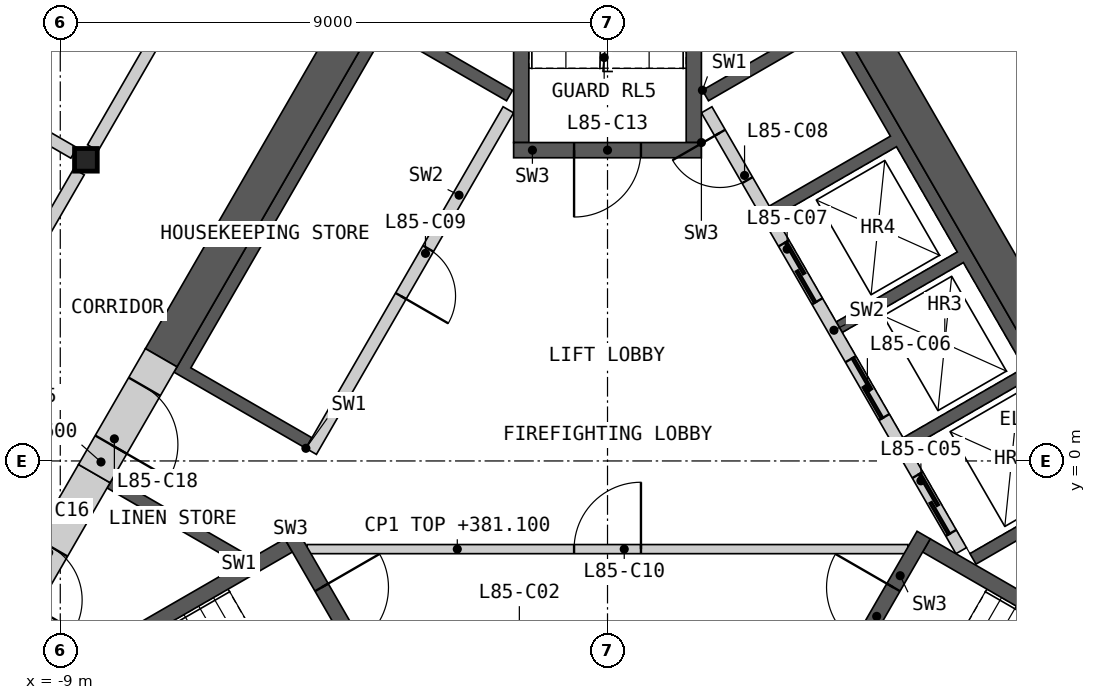
"""IFC4 building model, lengths in metres.
Left out: names, types, materials, properties, quantities, classifications, styles, units other than length and angle.
Written with IfcOpenShell. Run it as: python <this file> out.ifc"""

import sys

from ifc_helpers import new_model, si_unit, direction, frame, frame_2d, origin, origin_2d, place, context, subcontext, project, spatial, polyline, rectangle, i_section, outline, extrude, element, fill, save


model = new_model("IFC4")
c1 = context("Model", 3, precision=1e-05, world=origin(), true_north=direction((0.0, 1.0)))
c2 = subcontext(c1, "Body", "Model", "MODEL_VIEW")
j1 = project(units=[si_unit("LENGTHUNIT", "METRE"), si_unit("PLANEANGLEUNIT", "RADIAN")], contexts=[c1])
p1 = place(None, origin())
s1 = spatial("IfcSite", under=j1, at=p1, CompositionType="ELEMENT")
p2 = place(p1, origin())
s2 = spatial("IfcBuilding", under=s1, at=p2, CompositionType="ELEMENT")
p3 = place(p2, frame((0.0, 0.0, 378.0)))
s3 = spatial("IfcBuildingStorey", under=s2, at=p3, CompositionType="ELEMENT", Elevation=378.0)
p4 = place(p3, frame((-8.578, 4.953, 0.0), z_axis=(0.0, 0.0, 1.0), x_axis=(1.0, 0.0, 0.0)))
e1 = element("IfcColumn", 1, at=p4, inside=s3, PredefinedType="COLUMN", context=c2, shape_type="SweptSolid", body=[
    extrude(i_section(OverallWidth=0.374, OverallDepth=0.372, WebThickness=0.016, FlangeThickness=0.026, at=origin_2d()), origin(), (0.0, 0.0, 1.0), 3.4),
])
p5 = place(p3, origin())
e2 = element("IfcWall", 2, at=p5, inside=s3, PredefinedType="SHEAR", context=c2, shape_type="SweptSolid", body=[
    extrude(outline(polyline([(1.561, 6.097), (3.731, 7.35), (8.231, -0.444), (6.061, -1.697), (5.96, -1.524), (7.952, -0.374), (6.952, 1.358), (4.96, 0.208), (4.861, 0.381), (6.852, 1.531), (5.852, 3.263), (3.861, 2.113), (3.76, 2.287), (5.752, 3.437), (4.752, 5.169), (2.76, 4.019), (2.66, 4.192), (4.652, 5.342), (3.652, 7.074), (1.66, 5.924), (1.561, 6.097)])), origin(), (0.0, 0.0, 1.0), 3.1),
])
p6 = place(p3, frame((5.817, -1.476, 0.0), z_axis=(0.0, 0.0, 1.0), x_axis=(-0.500002616675, 0.866023893041, 0.0)))
e3 = element("IfcWall", 3, at=p6, inside=s3, PredefinedType="SOLIDWALL", context=c2, shape_type="SweptSolid", body=[
    extrude(rectangle(XDim=8.373, YDim=0.2, at=frame_2d((4.187, 0.0))), origin(), (0.0, 0.0, 1.0), 3.1),
])
p7 = place(p6, frame((0.337, 0.0, 0.0)))
e4 = element("IfcOpeningElement", 4, at=p7, cuts=e3, PredefinedType="OPENING", context=c2, shape_type="SweptSolid", body=[
    extrude(rectangle(XDim=1.1, YDim=2.1, at=frame_2d((0.55, 1.05))), frame((0.0, 0.11, 0.0), z_axis=(0.0, -1.0, 0.0), x_axis=(1.0, 0.0, 0.0)), (0.0, 0.0, 1.0), 0.22),
])
p8 = place(p6, frame((2.537, 0.0, 0.0)))
e5 = element("IfcOpeningElement", 5, at=p8, cuts=e3, PredefinedType="OPENING", context=c2, shape_type="SweptSolid", body=[
    extrude(rectangle(XDim=1.1, YDim=2.1, at=frame_2d((0.55, 1.05))), frame((0.0, 0.11, 0.0), z_axis=(0.0, -1.0, 0.0), x_axis=(1.0, 0.0, 0.0)), (0.0, 0.0, 1.0), 0.22),
])
p9 = place(p6, frame((4.737, 0.0, 0.0)))
e6 = element("IfcOpeningElement", 6, at=p9, cuts=e3, PredefinedType="OPENING", context=c2, shape_type="SweptSolid", body=[
    extrude(rectangle(XDim=1.1, YDim=2.1, at=frame_2d((0.55, 1.05))), frame((0.0, 0.11, 0.0), z_axis=(0.0, -1.0, 0.0), x_axis=(1.0, 0.0, 0.0)), (0.0, 0.0, 1.0), 0.22),
])
p10 = place(p6, frame((7.037, 0.0, 0.0)))
e7 = element("IfcOpeningElement", 7, at=p10, cuts=e3, PredefinedType="OPENING", context=c2, shape_type="SweptSolid", body=[
    extrude(rectangle(XDim=0.9, YDim=2.1, at=frame_2d((0.45, 1.05))), frame((0.0, 0.11, 0.0), z_axis=(0.0, -1.0, 0.0), x_axis=(1.0, 0.0, 0.0)), (0.0, 0.0, 1.0), 0.22),
])
p11 = place(p3, origin())
e8 = element("IfcWall", 8, at=p11, inside=s3, PredefinedType="SHEAR", context=c2, shape_type="SweptSolid", body=[
    extrude(outline(polyline([(-6.061, -1.697), (-8.231, -0.444), (-8.131, -0.271), (-5.96, -1.524), (-6.061, -1.697)])), origin(), (0.0, 0.0, 1.0), 3.1),
])
p12 = place(p3, origin())
e9 = element("IfcWall", 9, at=p12, inside=s3, PredefinedType="SHEAR", context=c2, shape_type="SweptSolid", body=[
    extrude(outline(polyline([(-4.96, 0.208), (-7.131, 1.461), (-3.731, 7.35), (-1.561, 6.097), (-1.66, 5.924), (-3.652, 7.074), (-6.852, 1.531), (-4.861, 0.381), (-4.96, 0.208)])), origin(), (0.0, 0.0, 1.0), 3.1),
])
p13 = place(p3, frame((-1.631, 5.776, 0.0), z_axis=(0.0, 0.0, 1.0), x_axis=(-0.499992876559, -0.866029516466, 0.0)))
e10 = element("IfcWall", 10, at=p13, inside=s3, PredefinedType="SOLIDWALL", context=c2, shape_type="SweptSolid", body=[
    extrude(rectangle(XDim=6.486, YDim=0.2, at=frame_2d((3.243, 0.0))), origin(), (0.0, 0.0, 1.0), 3.1),
])
p14 = place(p13, frame((2.637, 0.0, 0.0)))
e11 = element("IfcOpeningElement", 11, at=p14, cuts=e10, PredefinedType="OPENING", context=c2, shape_type="SweptSolid", body=[
    extrude(rectangle(XDim=0.9, YDim=2.1, at=frame_2d((0.45, 1.05))), frame((0.0, 0.11, 0.0), z_axis=(0.0, -1.0, 0.0), x_axis=(1.0, 0.0, 0.0)), (0.0, 0.0, 1.0), 0.22),
])
p15 = place(p3, frame((-4.941, -1.45, 0.0), z_axis=(0.0, 0.0, 1.0), x_axis=(1.0, 0.0, 0.0)))
e12 = element("IfcWall", 12, at=p15, inside=s3, PredefinedType="PARTITIONING", context=c2, shape_type="SweptSolid", body=[
    extrude(rectangle(XDim=9.882, YDim=0.15, at=frame_2d((4.941, 0.0))), origin(), (0.0, 0.0, 1.0), 3.1),
])
p16 = place(p15, frame((4.391, 0.0, 0.0)))
e13 = element("IfcOpeningElement", 13, at=p16, cuts=e12, PredefinedType="OPENING", context=c2, shape_type="SweptSolid", body=[
    extrude(rectangle(XDim=1.1, YDim=2.1, at=frame_2d((0.55, 1.05))), frame((0.0, 0.085, 0.0), z_axis=(0.0, -1.0, 0.0), x_axis=(1.0, 0.0, 0.0)), (0.0, 0.0, 1.0), 0.17),
])
p17 = place(p3, origin())
e14 = element("IfcWall", 14, at=p17, inside=s3, PredefinedType="SHEAR", context=c2, shape_type="SweptSolid", body=[
    extrude(outline(polyline([(-5.307, -1.281), (-10.374, -4.206), (-10.032, -4.298), (-5.182, -1.498), (-5.307, -1.281)])), origin(), (0.0, 0.0, 1.0), 3.1),
])
p18 = place(p3, frame((-5.199, -1.219, 0.0), z_axis=(0.0, 0.0, 1.0), x_axis=(0.499982516597, -0.866035497597, 0.0)))
e15 = element("IfcWall", 15, at=p18, inside=s3, PredefinedType="SHEAR", context=c2, shape_type="SweptSolid", body=[
    extrude(rectangle(XDim=3.088, YDim=0.25, at=frame_2d((1.544, 0.0))), origin(), (0.0, 0.0, 1.0), 3.1),
])
p19 = place(p18, frame((0.994, 0.0, 0.0)))
e16 = element("IfcOpeningElement", 16, at=p19, cuts=e15, PredefinedType="OPENING", context=c2, shape_type="SweptSolid", body=[
    extrude(rectangle(XDim=1.1, YDim=2.1, at=frame_2d((0.55, 1.05))), frame((0.0, 0.135, 0.0), z_axis=(0.0, -1.0, 0.0), x_axis=(1.0, 0.0, 0.0)), (0.0, 0.0, 1.0), 0.27),
])
p20 = place(p3, origin())
e17 = element("IfcWall", 17, at=p20, inside=s3, PredefinedType="SHEAR", context=c2, shape_type="SweptSolid", body=[
    extrude(outline(polyline([(10.032, -4.298), (10.374, -4.206), (5.307, -1.281), (5.182, -1.498), (10.032, -4.298)])), origin(), (0.0, 0.0, 1.0), 3.1),
])
p21 = place(p3, frame((3.655, -3.893, 0.0), z_axis=(0.0, 0.0, 1.0), x_axis=(0.499982516597, 0.866035497597, 0.0)))
e18 = element("IfcWall", 18, at=p21, inside=s3, PredefinedType="SHEAR", context=c2, shape_type="SweptSolid", body=[
    extrude(rectangle(XDim=3.088, YDim=0.25, at=frame_2d((1.544, 0.0))), origin(), (0.0, 0.0, 1.0), 3.1),
])
p22 = place(p21, frame((0.994, 0.0, 0.0)))
e19 = element("IfcOpeningElement", 19, at=p22, cuts=e18, PredefinedType="OPENING", context=c2, shape_type="SweptSolid", body=[
    extrude(rectangle(XDim=1.1, YDim=2.1, at=frame_2d((0.55, 1.05))), frame((0.0, 0.135, 0.0), z_axis=(0.0, -1.0, 0.0), x_axis=(1.0, 0.0, 0.0)), (0.0, 0.0, 1.0), 0.27),
])
p23 = place(p3, origin())
e20 = element("IfcWall", 20, at=p23, inside=s3, PredefinedType="SHEAR", context=c2, shape_type="SweptSolid", body=[
    extrude(outline(polyline([(1.544, 5.237), (1.544, 11.087), (1.294, 10.837), (1.294, 5.237), (1.544, 5.237)])), origin(), (0.0, 0.0, 1.0), 3.1),
])
p24 = place(p3, origin())
e21 = element("IfcWall", 21, at=p24, inside=s3, PredefinedType="SHEAR", context=c2, shape_type="SweptSolid", body=[
    extrude(outline(polyline([(-1.294, 10.837), (-1.544, 11.087), (-1.544, 5.237), (-1.294, 5.237), (-1.294, 10.837)])), origin(), (0.0, 0.0, 1.0), 3.1),
])
p25 = place(p3, frame((1.544, 5.112, 0.0), z_axis=(0.0, 0.0, 1.0), x_axis=(-1.0, 0.0, 0.0)))
e22 = element("IfcWall", 22, at=p25, inside=s3, PredefinedType="SHEAR", context=c2, shape_type="SweptSolid", body=[
    extrude(rectangle(XDim=3.088, YDim=0.25, at=frame_2d((1.544, 0.0))), origin(), (0.0, 0.0, 1.0), 3.1),
])
p26 = place(p25, frame((0.994, 0.0, 0.0)))
e23 = element("IfcOpeningElement", 23, at=p26, cuts=e22, PredefinedType="OPENING", context=c2, shape_type="SweptSolid", body=[
    extrude(rectangle(XDim=1.1, YDim=2.1, at=frame_2d((0.55, 1.05))), frame((0.0, 0.135, 0.0), z_axis=(0.0, -1.0, 0.0), x_axis=(1.0, 0.0, 0.0)), (0.0, 0.0, 1.0), 0.27),
])
p27 = place(p3, frame((8.686, -0.634, 0.0), z_axis=(0.0, 0.0, 1.0), x_axis=(-0.500004601921, 0.866022746848, 0.0)))
e24 = element("IfcWall", 24, at=p27, inside=s3, PredefinedType="SHEAR", context=c2, shape_type="SweptSolid", body=[
    extrude(rectangle(XDim=16.853, YDim=0.6, at=frame_2d((8.426, 0.0))), origin(), (0.0, 0.0, 1.0), 3.1),
])
p28 = place(p3, frame((-3.794, 7.84, 0.0), z_axis=(0.0, 0.0, 1.0), x_axis=(-0.499974747889, -0.866039982607, 0.0)))
e25 = element("IfcWall", 25, at=p28, inside=s3, PredefinedType="SHEAR", context=c2, shape_type="SweptSolid", body=[
    extrude(rectangle(XDim=7.092, YDim=0.6, at=frame_2d((3.546, 0.0))), origin(), (0.0, 0.0, 1.0), 3.1),
])
p29 = place(p3, frame((-8.44, -0.208, 0.0), z_axis=(0.0, 0.0, 1.0), x_axis=(-0.499997052475, -0.866027105532, 0.0)))
e26 = element("IfcWall", 26, at=p29, inside=s3, PredefinedType="SHEAR", context=c2, shape_type="SweptSolid", body=[
    extrude(rectangle(XDim=3.001, YDim=0.6, at=frame_2d((1.501, 0.0))), origin(), (0.0, 0.0, 1.0), 3.1),
])
p30 = place(p29, frame((1.4, 0.0, 0.0)))
e27 = element("IfcOpeningElement", 27, at=p30, cuts=e26, PredefinedType="OPENING", context=c2, shape_type="SweptSolid", body=[
    extrude(rectangle(XDim=1.0, YDim=2.1, at=frame_2d((0.5, 1.05))), frame((0.0, 0.31, 0.0), z_axis=(0.0, -1.0, 0.0), x_axis=(1.0, 0.0, 0.0)), (0.0, 0.0, 1.0), 0.62),
])
p31 = place(p3, frame((-7.34, 1.698, 0.0), z_axis=(0.0, 0.0, 1.0), x_axis=(-0.50002983664, -0.866008176907, 0.0)))
e28 = element("IfcWall", 28, at=p31, inside=s3, PredefinedType="SHEAR", context=c2, shape_type="SweptSolid", body=[
    extrude(rectangle(XDim=2.2, YDim=0.6, at=frame_2d((1.1, 0.0))), origin(), (0.0, 0.0, 1.0), 3.1),
])
p32 = place(p31, frame((0.55, 0.0, 0.0)))
e29 = element("IfcOpeningElement", 29, at=p32, cuts=e28, PredefinedType="OPENING", context=c2, shape_type="SweptSolid", body=[
    extrude(rectangle(XDim=1.1, YDim=2.1, at=frame_2d((0.55, 1.05))), frame((0.0, 0.31, 0.0), z_axis=(0.0, -1.0, 0.0), x_axis=(1.0, 0.0, 0.0)), (0.0, 0.0, 1.0), 0.62),
])
p33 = place(p3, frame((4.403, 12.185, 0.0), z_axis=(0.0, 0.0, 1.0), x_axis=(0.499992155518, -0.866029932751, 0.0)))
e30 = element("IfcWall", 30, at=p33, inside=s3, PredefinedType="PARTITIONING", context=c2, shape_type="SweptSolid", body=[
    extrude(rectangle(XDim=8.123, YDim=0.2, at=frame_2d((4.062, 0.0))), origin(), (0.0, 0.0, 1.0), 3.1),
])
p34 = place(p33, frame((3.963, 0.0, 0.0)))
e31 = element("IfcOpeningElement", 31, at=p34, cuts=e30, PredefinedType="OPENING", context=c2, shape_type="SweptSolid", body=[
    extrude(rectangle(XDim=1.0, YDim=2.1, at=frame_2d((0.5, 1.05))), frame((0.0, 0.11, 0.0), z_axis=(0.0, -1.0, 0.0), x_axis=(1.0, 0.0, 0.0)), (0.0, 0.0, 1.0), 0.22),
])
p35 = place(p3, frame((-8.465, 5.15, 0.0), z_axis=(0.0, 0.0, 1.0), x_axis=(0.499992155518, 0.866029932751, 0.0)))
e32 = element("IfcWall", 32, at=p35, inside=s3, PredefinedType="PARTITIONING", context=c2, shape_type="SweptSolid", body=[
    extrude(rectangle(XDim=8.123, YDim=0.2, at=frame_2d((4.062, 0.0))), origin(), (0.0, 0.0, 1.0), 3.1),
])
p36 = place(p35, frame((3.587, 0.0, 0.0)))
e33 = element("IfcOpeningElement", 33, at=p36, cuts=e32, PredefinedType="OPENING", context=c2, shape_type="SweptSolid", body=[
    extrude(rectangle(XDim=0.95, YDim=2.1, at=frame_2d((0.475, 1.05))), frame((0.0, 0.11, 0.0), z_axis=(0.0, -1.0, 0.0), x_axis=(1.0, 0.0, 0.0)), (0.0, 0.0, 1.0), 0.22),
])
p37 = place(p3, frame((-12.754, -2.279, 0.0), z_axis=(0.0, 0.0, 1.0), x_axis=(0.500001682468, 0.866024432409, 0.0)))
e34 = element("IfcWall", 34, at=p37, inside=s3, PredefinedType="PARTITIONING", context=c2, shape_type="SweptSolid", body=[
    extrude(rectangle(XDim=8.124, YDim=0.2, at=frame_2d((4.062, 0.0))), origin(), (0.0, 0.0, 1.0), 3.1),
])
p38 = place(p37, frame((3.762, 0.0, 0.0)))
e35 = element("IfcOpeningElement", 35, at=p38, cuts=e34, PredefinedType="OPENING", context=c2, shape_type="SweptSolid", body=[
    extrude(rectangle(XDim=1.0, YDim=2.1, at=frame_2d((0.5, 1.05))), frame((0.0, 0.11, 0.0), z_axis=(0.0, -1.0, 0.0), x_axis=(1.0, 0.0, 0.0)), (0.0, 0.0, 1.0), 0.22),
])
p39 = place(p3, frame((-11.473, 6.74, 0.0), z_axis=(0.0, 0.0, 1.0), x_axis=(0.500001082559, 0.866024778768, 0.0)))
e36 = element("IfcWall", 36, at=p39, inside=s3, PredefinedType="PARTITIONING", context=c2, shape_type="SweptSolid", body=[
    extrude(rectangle(XDim=15.094, YDim=0.2, at=frame_2d((7.547, 0.0))), origin(), (0.0, 0.0, 1.0), 2.33),
])
p40 = place(p39, frame((10.383, 0.0, 0.0)))
e37 = element("IfcOpeningElement", 37, at=p40, cuts=e36, PredefinedType="OPENING", context=c2, shape_type="SweptSolid", body=[
    extrude(rectangle(XDim=0.95, YDim=2.1, at=frame_2d((0.475, 1.05))), frame((0.0, 0.11, 0.0), z_axis=(0.0, -1.0, 0.0), x_axis=(1.0, 0.0, 0.0)), (0.0, 0.0, 1.0), 0.22),
])
p41 = place(p3, frame((-18.869, 10.894, 0.0), z_axis=(0.0, 0.0, 1.0), x_axis=(0.866023724155, -0.500002909193, 0.0)))
e38 = element("IfcWall", 38, at=p41, inside=s3, PredefinedType="PARTITIONING", context=c2, shape_type="SweptSolid", body=[
    extrude(rectangle(XDim=11.655, YDim=0.2, at=frame_2d((5.827, 0.0))), origin(), (0.0, 0.0, 1.0), 2.33),
])
p42 = place(p7, origin())
e39 = element("IfcDoor", 39, at=p42, inside=s3, OperationType="SLIDING_TO_LEFT", PredefinedType="DOOR", context=c2, shape_type="SweptSolid", body=[
    extrude(rectangle(XDim=1.1, YDim=2.1, at=frame_2d((0.55, 1.05))), frame((0.0, 0.025, 0.0), z_axis=(0.0, -1.0, 0.0), x_axis=(1.0, 0.0, 0.0)), (0.0, 0.0, 1.0), 0.05),
])
fill(e4, e39)
p43 = place(p8, origin())
e40 = element("IfcDoor", 40, at=p43, inside=s3, OperationType="SLIDING_TO_LEFT", PredefinedType="DOOR", context=c2, shape_type="SweptSolid", body=[
    extrude(rectangle(XDim=1.1, YDim=2.1, at=frame_2d((0.55, 1.05))), frame((0.0, 0.025, 0.0), z_axis=(0.0, -1.0, 0.0), x_axis=(1.0, 0.0, 0.0)), (0.0, 0.0, 1.0), 0.05),
])
fill(e5, e40)
p44 = place(p9, origin())
e41 = element("IfcDoor", 41, at=p44, inside=s3, OperationType="SLIDING_TO_LEFT", PredefinedType="DOOR", context=c2, shape_type="SweptSolid", body=[
    extrude(rectangle(XDim=1.1, YDim=2.1, at=frame_2d((0.55, 1.05))), frame((0.0, 0.025, 0.0), z_axis=(0.0, -1.0, 0.0), x_axis=(1.0, 0.0, 0.0)), (0.0, 0.0, 1.0), 0.05),
])
fill(e6, e41)
p45 = place(p10, origin())
e42 = element("IfcDoor", 42, at=p45, inside=s3, OperationType="SINGLE_SWING_RIGHT", PredefinedType="DOOR", context=c2, shape_type="SweptSolid", body=[
    extrude(rectangle(XDim=0.9, YDim=2.1, at=frame_2d((0.45, 1.05))), frame((0.0, 0.025, 0.0), z_axis=(0.0, -1.0, 0.0), x_axis=(1.0, 0.0, 0.0)), (0.0, 0.0, 1.0), 0.05),
])
fill(e7, e42)
p46 = place(p14, origin())
e43 = element("IfcDoor", 43, at=p46, inside=s3, OperationType="SINGLE_SWING_RIGHT", PredefinedType="DOOR", context=c2, shape_type="SweptSolid", body=[
    extrude(rectangle(XDim=0.9, YDim=2.1, at=frame_2d((0.45, 1.05))), frame((0.0, 0.025, 0.0), z_axis=(0.0, -1.0, 0.0), x_axis=(1.0, 0.0, 0.0)), (0.0, 0.0, 1.0), 0.05),
])
fill(e11, e43)
p47 = place(p16, origin())
e44 = element("IfcDoor", 44, at=p47, inside=s3, OperationType="SINGLE_SWING_RIGHT", PredefinedType="DOOR", context=c2, shape_type="SweptSolid", body=[
    extrude(rectangle(XDim=1.1, YDim=2.1, at=frame_2d((0.55, 1.05))), frame((0.0, 0.025, 0.0), z_axis=(0.0, -1.0, 0.0), x_axis=(1.0, 0.0, 0.0)), (0.0, 0.0, 1.0), 0.05),
])
fill(e13, e44)
p48 = place(p19, origin())
e45 = element("IfcDoor", 45, at=p48, inside=s3, OperationType="SINGLE_SWING_LEFT", PredefinedType="DOOR", context=c2, shape_type="SweptSolid", body=[
    extrude(rectangle(XDim=1.1, YDim=2.1, at=frame_2d((0.55, 1.05))), frame((0.0, 0.025, 0.0), z_axis=(0.0, -1.0, 0.0), x_axis=(1.0, 0.0, 0.0)), (0.0, 0.0, 1.0), 0.05),
])
fill(e16, e45)
p49 = place(p22, origin())
e46 = element("IfcDoor", 46, at=p49, inside=s3, OperationType="SINGLE_SWING_RIGHT", PredefinedType="DOOR", context=c2, shape_type="SweptSolid", body=[
    extrude(rectangle(XDim=1.1, YDim=2.1, at=frame_2d((0.55, 1.05))), frame((0.0, 0.025, 0.0), z_axis=(0.0, -1.0, 0.0), x_axis=(1.0, 0.0, 0.0)), (0.0, 0.0, 1.0), 0.05),
])
fill(e19, e46)
p50 = place(p26, origin())
e47 = element("IfcDoor", 47, at=p50, inside=s3, OperationType="SINGLE_SWING_RIGHT", PredefinedType="DOOR", context=c2, shape_type="SweptSolid", body=[
    extrude(rectangle(XDim=1.1, YDim=2.1, at=frame_2d((0.55, 1.05))), frame((0.0, 0.025, 0.0), z_axis=(0.0, -1.0, 0.0), x_axis=(1.0, 0.0, 0.0)), (0.0, 0.0, 1.0), 0.05),
])
fill(e23, e47)
p51 = place(p30, origin())
e48 = element("IfcDoor", 48, at=p51, inside=s3, OperationType="SINGLE_SWING_RIGHT", PredefinedType="DOOR", context=c2, shape_type="SweptSolid", body=[
    extrude(rectangle(XDim=1.0, YDim=2.1, at=frame_2d((0.5, 1.05))), frame((0.0, 0.055, 0.0), z_axis=(0.0, -1.0, 0.0), x_axis=(1.0, 0.0, 0.0)), (0.0, 0.0, 1.0), 0.05),
])
fill(e27, e48)
p52 = place(p32, origin())
e49 = element("IfcDoor", 49, at=p52, inside=s3, OperationType="SINGLE_SWING_RIGHT", PredefinedType="DOOR", context=c2, shape_type="SweptSolid", body=[
    extrude(rectangle(XDim=1.1, YDim=2.1, at=frame_2d((0.55, 1.05))), frame((0.0, 0.055, 0.0), z_axis=(0.0, -1.0, 0.0), x_axis=(1.0, 0.0, 0.0)), (0.0, 0.0, 1.0), 0.05),
])
fill(e29, e49)
save(model, sys.argv[1])
